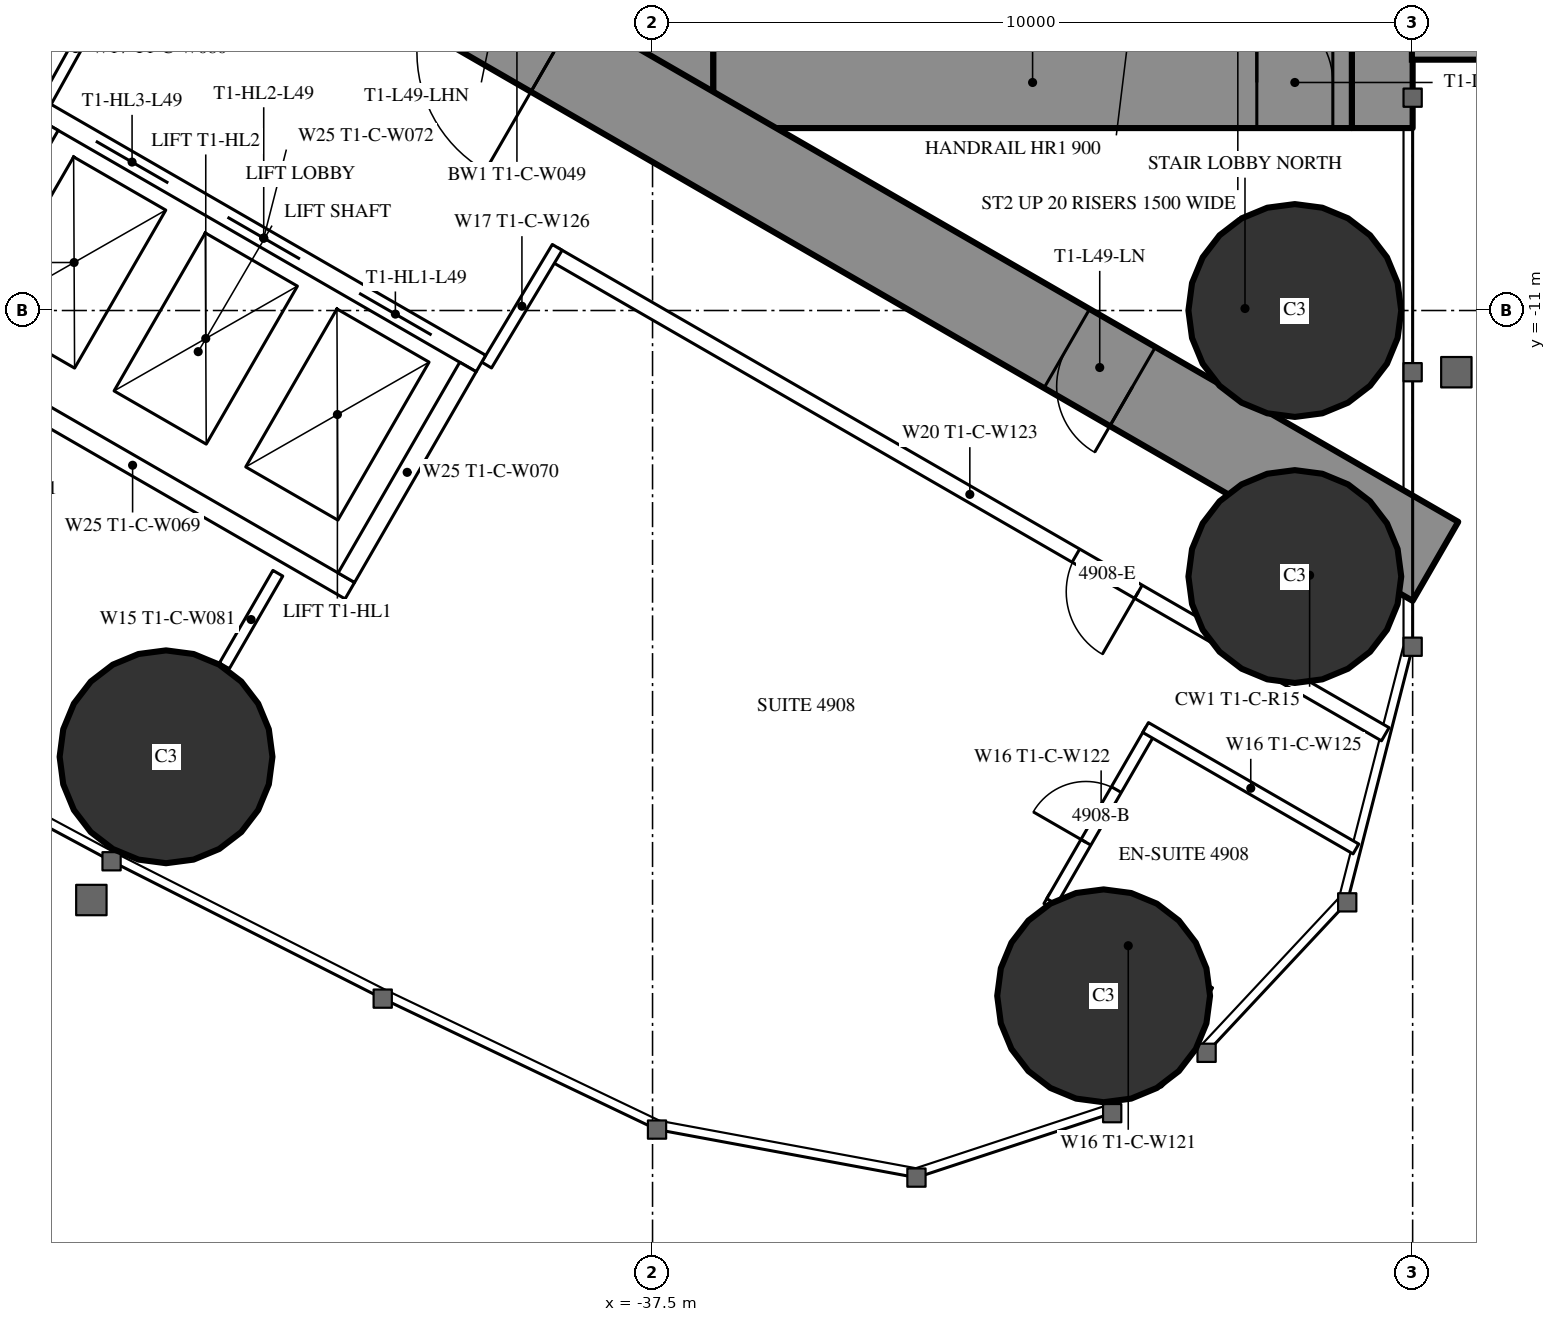
"""IFC4 building model, lengths in metres.
Left out: names, types, materials, properties, quantities, classifications, styles, units other than length and angle.
Written with IfcOpenShell. Run it as: python <this file> out.ifc"""

import sys

from ifc_helpers import new_model, si_unit, direction, frame, frame_2d, origin, origin_2d, place, context, subcontext, project, spatial, rectangle, circle, extrude, element, fill, save


model = new_model("IFC4")
c1 = context("Model", 3, precision=1e-05, world=origin(), true_north=direction((0.0, 1.0)))
c2 = subcontext(c1, "Body", "Model", "MODEL_VIEW")
j1 = project(units=[si_unit("LENGTHUNIT", "METRE"), si_unit("PLANEANGLEUNIT", "RADIAN")], contexts=[c1])
p1 = place(None, origin())
s1 = spatial("IfcSite", under=j1, at=p1, CompositionType="ELEMENT")
p2 = place(p1, origin())
s2 = spatial("IfcBuilding", under=s1, at=p2, CompositionType="ELEMENT")
p3 = place(p2, frame((0.0, 0.0, 184.3)))
s3 = spatial("IfcBuildingStorey", under=s2, at=p3, CompositionType="ELEMENT", Elevation=184.3)
for number, where, z_axis, x_axis in (
    (1, (-31.565, -20.016, 0.0), (0.0, 0.0, 1.0), (1.0, 0.0, 0.0)),
    (2, (-29.05, -11.0, 0.0), (0.0, 0.0, 1.0), (1.0, 0.0, 0.0)),
    (3, (-29.05, -14.5, 0.0), (0.0, 0.0, 1.0), (1.0, 0.0, 0.0)),
    (4, (-43.9, -16.871, 0.0), (0.0, 0.0, 1.0), (1.0, 0.0, 0.0)),
):
    element("IfcColumn", number, at=place(p3, frame(where, z_axis=z_axis, x_axis=x_axis)), inside=s3, PredefinedType="COLUMN", context=c2, shape_type="SweptSolid", body=[
        extrude(circle(Radius=1.4, at=origin_2d()), origin(), (0.0, 0.0, 1.0), 3.5),
    ])
p4 = place(p3, frame((-27.9, 8.6, 0.0), z_axis=(0.0, 0.0, 1.0), x_axis=(0.0, -1.0, 0.0)))
e5 = element("IfcWall", 5, at=p4, inside=s3, PredefinedType="SHEAR", context=c2, shape_type="SweptSolid", body=[
    extrude(rectangle(XDim=17.2, YDim=0.8, at=frame_2d((8.6, 0.0))), origin(), (0.0, 0.0, 1.0), 3.5),
])
p5 = place(p4, frame((2.45, 0.0, 0.6)))
e6 = element("IfcOpeningElement", 6, at=p5, cuts=e5, PredefinedType="OPENING", context=c2, shape_type="SweptSolid", body=[
    extrude(rectangle(XDim=0.6, YDim=2.1, at=frame_2d((0.3, 1.05))), frame((0.0, 0.41, 0.0), z_axis=(0.0, -1.0, 0.0), x_axis=(1.0, 0.0, 0.0)), (0.0, 0.0, 1.0), 0.82),
])
p6 = place(p4, frame((14.15, 0.0, 0.6)))
e7 = element("IfcOpeningElement", 7, at=p6, cuts=e5, PredefinedType="OPENING", context=c2, shape_type="SweptSolid", body=[
    extrude(rectangle(XDim=0.6, YDim=2.1, at=frame_2d((0.3, 1.05))), frame((0.0, 0.41, 0.0), z_axis=(0.0, -1.0, 0.0), x_axis=(1.0, 0.0, 0.0)), (0.0, 0.0, 1.0), 0.82),
])
p7 = place(p3, frame((-37.3, 8.6, 0.0), z_axis=(0.0, 0.0, 1.0), x_axis=(0.0, -1.0, 0.0)))
e8 = element("IfcWall", 8, at=p7, inside=s3, PredefinedType="SHEAR", context=c2, shape_type="SweptSolid", body=[
    extrude(rectangle(XDim=17.2, YDim=1.2, at=frame_2d((8.6, 0.0))), origin(), (0.0, 0.0, 1.0), 3.5),
])
p8 = place(p7, frame((7.7, 0.0, 0.0)))
e9 = element("IfcOpeningElement", 9, at=p8, cuts=e8, PredefinedType="OPENING", context=c2, shape_type="SweptSolid", body=[
    extrude(rectangle(XDim=1.8, YDim=2.2, at=frame_2d((0.9, 1.1))), frame((0.0, 0.61, 0.0), z_axis=(0.0, -1.0, 0.0), x_axis=(1.0, 0.0, 0.0)), (0.0, 0.0, 1.0), 1.22),
])
p9 = place(p3, frame((-28.3, -8.0, 0.0), z_axis=(0.0, 0.0, 1.0), x_axis=(-1.0, 0.0, 0.0)))
e10 = element("IfcWall", 10, at=p9, inside=s3, PredefinedType="SHEAR", context=c2, shape_type="SweptSolid", body=[
    extrude(rectangle(XDim=8.4, YDim=1.2, at=frame_2d((4.2, 0.0))), origin(), (0.0, 0.0, 1.0), 3.5),
])
p10 = place(p9, frame((0.25, 0.0, 0.0)))
e11 = element("IfcOpeningElement", 11, at=p10, cuts=e10, PredefinedType="OPENING", context=c2, shape_type="SweptSolid", body=[
    extrude(rectangle(XDim=1.0, YDim=2.2, at=frame_2d((0.5, 1.1))), frame((0.0, 0.61, 0.0), z_axis=(0.0, -1.0, 0.0), x_axis=(1.0, 0.0, 0.0)), (0.0, 0.0, 1.0), 1.22),
])
p11 = place(p3, frame((-27.2, -14.3, 0.0), z_axis=(0.0, 0.0, 1.0), x_axis=(-0.866024021859, 0.500002393557, 0.0)))
e12 = element("IfcWall", 12, at=p11, inside=s3, PredefinedType="SHEAR", context=c2, shape_type="SweptSolid", body=[
    extrude(rectangle(XDim=27.907, YDim=1.2, at=frame_2d((13.954, 0.0))), origin(), (0.0, 0.0, 1.0), 3.5),
])
p12 = place(p11, frame((4.6, 0.0, 0.0)))
e13 = element("IfcOpeningElement", 13, at=p12, cuts=e12, PredefinedType="OPENING", context=c2, shape_type="SweptSolid", body=[
    extrude(rectangle(XDim=1.0, YDim=2.2, at=frame_2d((0.5, 1.1))), frame((0.0, 0.61, 0.0), z_axis=(0.0, -1.0, 0.0), x_axis=(1.0, 0.0, 0.0)), (0.0, 0.0, 1.0), 1.22),
])
p13 = place(p11, frame((13.395, 0.0, 0.0)))
e14 = element("IfcOpeningElement", 14, at=p13, cuts=e12, PredefinedType="OPENING", context=c2, shape_type="SweptSolid", body=[
    extrude(rectangle(XDim=1.8, YDim=2.2, at=frame_2d((0.9, 1.1))), frame((0.0, 0.61, 0.0), z_axis=(0.0, -1.0, 0.0), x_axis=(1.0, 0.0, 0.0)), (0.0, 0.0, 1.0), 1.22),
])
p14 = place(p3, frame((-42.429, -14.457, 0.0), z_axis=(0.0, 0.0, 1.0), x_axis=(-0.5000578829, -0.865991982497, 0.0)))
e15 = element("IfcWall", 15, at=p14, inside=s3, PredefinedType="PARTITIONING", context=c2, shape_type="SweptSolid", body=[
    extrude(rectangle(XDim=1.407, YDim=0.15, at=frame_2d((0.704, 0.0))), origin(), (0.0, 0.0, 1.0), 3.25),
])
p15 = place(p3, frame((-27.86, -16.575, 0.0), z_axis=(0.0, 0.0, 1.0), x_axis=(-0.866027756871, 0.499995924312, 0.0)))
e16 = element("IfcWall", 16, at=p15, inside=s3, PredefinedType="PARTITIONING", context=c2, shape_type="SweptSolid", body=[
    extrude(rectangle(XDim=12.622, YDim=0.2, at=frame_2d((6.311, 0.0))), origin(), (0.0, 0.0, 1.0), 3.25),
])
p16 = place(p15, frame((3.75, 0.0, 0.0)))
e17 = element("IfcOpeningElement", 17, at=p16, cuts=e16, PredefinedType="OPENING", context=c2, shape_type="SweptSolid", body=[
    extrude(rectangle(XDim=0.95, YDim=2.2, at=frame_2d((0.475, 1.1))), frame((0.0, 0.11, 0.0), z_axis=(0.0, -1.0, 0.0), x_axis=(1.0, 0.0, 0.0)), (0.0, 0.0, 1.0), 0.22),
])
for number, where, z_axis, x_axis in (
    (18, (-39.683, -11.718, 0.0), (0.0, 0.0, 1.0), (0.514, 0.858, 0.0)),
    (19, (-44.652, -6.764, 0.0), (0.0, 0.0, 1.0), (-0.485, -0.874, 0.0)),
):
    element("IfcWall", number, at=place(p3, frame(where, z_axis=z_axis, x_axis=x_axis)), inside=s3, PredefinedType="PARTITIONING", context=c2, shape_type="SweptSolid", body=[
        extrude(rectangle(XDim=1.805, YDim=0.15, at=frame_2d((0.903, 0.0))), origin(), (0.0, 0.0, 1.0), 3.25),
    ])
p17 = place(p3, frame((-30.17, -19.975, 0.0), z_axis=(0.0, 0.0, 1.0), x_axis=(-0.866006523861, 0.500032699561, 0.0)))
e20 = element("IfcWall", 20, at=p17, inside=s3, PredefinedType="PARTITIONING", context=c2, shape_type="SweptSolid", body=[
    extrude(rectangle(XDim=2.475, YDim=0.15, at=frame_2d((1.237, 0.0))), origin(), (0.0, 0.0, 1.0), 3.25),
])
p18 = place(p3, frame((-30.948, -16.524, 0.0), z_axis=(0.0, 0.0, 1.0), x_axis=(-0.500006934395, -0.866021400173, 0.0)))
e21 = element("IfcWall", 21, at=p18, inside=s3, PredefinedType="PARTITIONING", context=c2, shape_type="SweptSolid", body=[
    extrude(rectangle(XDim=2.6, YDim=0.15, at=frame_2d((1.3, 0.0))), origin(), (0.0, 0.0, 1.0), 2.3),
])
p19 = place(p18, frame((0.9, 0.0, 0.0)))
e22 = element("IfcOpeningElement", 22, at=p19, cuts=e21, PredefinedType="OPENING", context=c2, shape_type="SweptSolid", body=[
    extrude(rectangle(XDim=0.8, YDim=2.2, at=frame_2d((0.4, 1.1))), frame((0.0, 0.085, 0.0), z_axis=(0.0, -1.0, 0.0), x_axis=(1.0, 0.0, 0.0)), (0.0, 0.0, 1.0), 0.17),
])
p20 = place(p3, frame((-28.246, -18.084, 0.0), z_axis=(0.0, 0.0, 1.0), x_axis=(-0.866029063467, 0.49999366119, 0.0)))
e23 = element("IfcWall", 23, at=p20, inside=s3, PredefinedType="PARTITIONING", context=c2, shape_type="SweptSolid", body=[
    extrude(rectangle(XDim=3.195, YDim=0.15, at=frame_2d((1.597, 0.0))), origin(), (0.0, 0.0, 1.0), 3.25),
])
p21 = place(p3, frame((-39.758, -11.697, 0.0), z_axis=(0.0, 0.0, 1.0), x_axis=(-0.866024194504, 0.500002094529, 0.0)))
e24 = element("IfcWall", 24, at=p21, inside=s3, PredefinedType="PARTITIONING", context=c2, shape_type="SweptSolid", body=[
    extrude(rectangle(XDim=6.6, YDim=0.25, at=frame_2d((3.3, 0.0))), origin(), (0.0, 0.0, 1.0), 3.25),
])
p22 = place(p21, frame((0.75, 0.0, 0.0)))
e25 = element("IfcOpeningElement", 25, at=p22, cuts=e24, PredefinedType="OPENING", context=c2, shape_type="SweptSolid", body=[
    extrude(rectangle(XDim=1.1, YDim=2.2, at=frame_2d((0.55, 1.1))), frame((0.0, 0.135, 0.0), z_axis=(0.0, -1.0, 0.0), x_axis=(1.0, 0.0, 0.0)), (0.0, 0.0, 1.0), 0.27),
])
p23 = place(p21, frame((2.75, 0.0, 0.0)))
e26 = element("IfcOpeningElement", 26, at=p23, cuts=e24, PredefinedType="OPENING", context=c2, shape_type="SweptSolid", body=[
    extrude(rectangle(XDim=1.1, YDim=2.2, at=frame_2d((0.55, 1.1))), frame((0.0, 0.135, 0.0), z_axis=(0.0, -1.0, 0.0), x_axis=(1.0, 0.0, 0.0)), (0.0, 0.0, 1.0), 0.27),
])
p24 = place(p21, frame((4.75, 0.0, 0.0)))
e27 = element("IfcOpeningElement", 27, at=p24, cuts=e24, PredefinedType="OPENING", context=c2, shape_type="SweptSolid", body=[
    extrude(rectangle(XDim=1.1, YDim=2.2, at=frame_2d((0.55, 1.1))), frame((0.0, 0.135, 0.0), z_axis=(0.0, -1.0, 0.0), x_axis=(1.0, 0.0, 0.0)), (0.0, 0.0, 1.0), 0.27),
])
p25 = place(p3, frame((-41.482, -14.686, 0.0), z_axis=(0.0, 0.0, 1.0), x_axis=(-0.86603344179, 0.499986077507, 0.0)))
e28 = element("IfcWall", 28, at=p25, inside=s3, PredefinedType="PARTITIONING", context=c2, shape_type="SweptSolid", body=[
    extrude(rectangle(XDim=6.6, YDim=0.25, at=frame_2d((3.3, 0.0))), origin(), (0.0, 0.0, 1.0), 3.25),
])
for number, where, z_axis, x_axis in (
    (29, (-39.928, -11.743, 0.0), (0.0, 0.0, 1.0), (-0.5, -0.866, 0.0)),
    (30, (-45.428, -8.568, 0.0), (0.0, 0.0, 1.0), (-0.5, -0.866, 0.0)),
):
    element("IfcWall", number, at=place(p3, frame(where, z_axis=z_axis, x_axis=x_axis)), inside=s3, PredefinedType="PARTITIONING", context=c2, shape_type="SweptSolid", body=[
        extrude(rectangle(XDim=3.201, YDim=0.25, at=frame_2d((1.6, 0.0))), origin(), (0.0, 0.0, 1.0), 3.25),
    ])
p26 = place(p19, origin())
e31 = element("IfcDoor", 31, at=p26, inside=s3, OperationType="SINGLE_SWING_RIGHT", PredefinedType="DOOR", context=c2, shape_type="SweptSolid", body=[
    extrude(rectangle(XDim=0.8, YDim=2.2, at=frame_2d((0.4, 1.1))), frame((0.0, 0.025, 0.0), z_axis=(0.0, -1.0, 0.0), x_axis=(1.0, 0.0, 0.0)), (0.0, 0.0, 1.0), 0.05),
])
fill(e22, e31)
p27 = place(p16, origin())
e32 = element("IfcDoor", 32, at=p27, inside=s3, OperationType="SINGLE_SWING_LEFT", PredefinedType="DOOR", context=c2, shape_type="SweptSolid", body=[
    extrude(rectangle(XDim=0.95, YDim=2.2, at=frame_2d((0.475, 1.1))), frame((0.0, 0.025, 0.0), z_axis=(0.0, -1.0, 0.0), x_axis=(1.0, 0.0, 0.0)), (0.0, 0.0, 1.0), 0.05),
])
fill(e17, e32)
p28 = place(p12, origin())
e33 = element("IfcDoor", 33, at=p28, inside=s3, OperationType="SINGLE_SWING_LEFT", PredefinedType="DOOR", context=c2, shape_type="SweptSolid", body=[
    extrude(rectangle(XDim=1.0, YDim=2.2, at=frame_2d((0.5, 1.1))), frame((0.0, 0.025, 0.0), z_axis=(0.0, -1.0, 0.0), x_axis=(1.0, 0.0, 0.0)), (0.0, 0.0, 1.0), 0.05),
])
fill(e13, e33)
p29 = place(p13, origin())
e34 = element("IfcDoor", 34, at=p29, inside=s3, OperationType="DOUBLE_DOOR_SINGLE_SWING", PredefinedType="DOOR", context=c2, shape_type="SweptSolid", body=[
    extrude(rectangle(XDim=1.8, YDim=2.2, at=frame_2d((0.9, 1.1))), frame((0.0, 0.025, 0.0), z_axis=(0.0, -1.0, 0.0), x_axis=(1.0, 0.0, 0.0)), (0.0, 0.0, 1.0), 0.05),
])
fill(e14, e34)
p30 = place(p10, origin())
e35 = element("IfcDoor", 35, at=p30, inside=s3, OperationType="SINGLE_SWING_RIGHT", PredefinedType="DOOR", context=c2, shape_type="SweptSolid", body=[
    extrude(rectangle(XDim=1.0, YDim=2.2, at=frame_2d((0.5, 1.1))), frame((0.0, 0.025, 0.0), z_axis=(0.0, -1.0, 0.0), x_axis=(1.0, 0.0, 0.0)), (0.0, 0.0, 1.0), 0.05),
])
fill(e11, e35)
p31 = place(p22, origin())
e36 = element("IfcDoor", 36, at=p31, inside=s3, OperationType="DOUBLE_DOOR_SLIDING", PredefinedType="USERDEFINED", context=c2, shape_type="SweptSolid", body=[
    extrude(rectangle(XDim=1.1, YDim=2.2, at=frame_2d((0.55, 1.1))), frame((0.0, 0.025, 0.0), z_axis=(0.0, -1.0, 0.0), x_axis=(1.0, 0.0, 0.0)), (0.0, 0.0, 1.0), 0.05),
])
fill(e25, e36)
p32 = place(p23, origin())
e37 = element("IfcDoor", 37, at=p32, inside=s3, OperationType="DOUBLE_DOOR_SLIDING", PredefinedType="USERDEFINED", context=c2, shape_type="SweptSolid", body=[
    extrude(rectangle(XDim=1.1, YDim=2.2, at=frame_2d((0.55, 1.1))), frame((0.0, 0.025, 0.0), z_axis=(0.0, -1.0, 0.0), x_axis=(1.0, 0.0, 0.0)), (0.0, 0.0, 1.0), 0.05),
])
fill(e26, e37)
p33 = place(p24, origin())
e38 = element("IfcDoor", 38, at=p33, inside=s3, OperationType="DOUBLE_DOOR_SLIDING", PredefinedType="USERDEFINED", context=c2, shape_type="SweptSolid", body=[
    extrude(rectangle(XDim=1.1, YDim=2.2, at=frame_2d((0.55, 1.1))), frame((0.0, 0.025, 0.0), z_axis=(0.0, -1.0, 0.0), x_axis=(1.0, 0.0, 0.0)), (0.0, 0.0, 1.0), 0.05),
])
fill(e27, e38)
save(model, sys.argv[1])
